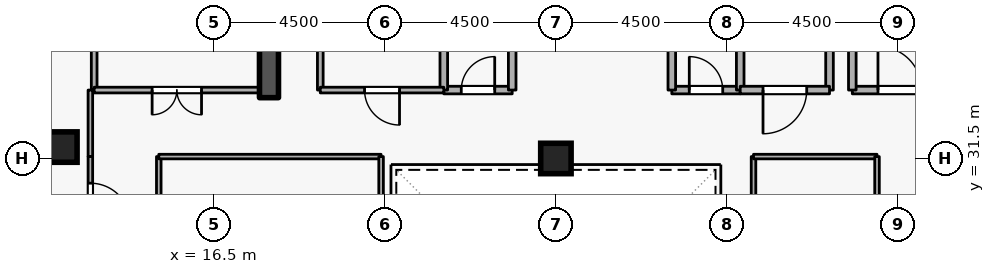
"""IFC4 building model, lengths in metres.
Left out: names, types, materials, properties, quantities, classifications, styles, units other than length and angle.
Written with IfcOpenShell. Run it as: python <this file> out.ifc"""

import sys

from ifc_helpers import new_model, si_unit, direction, frame, frame_2d, origin, origin_2d, place, context, subcontext, project, spatial, rectangle, extrude, element, fill, save


model = new_model("IFC4")
c1 = context("Model", 3, precision=1e-05, world=origin(), true_north=direction((0.0, 1.0)))
c2 = subcontext(c1, "Body", "Model", "MODEL_VIEW")
j1 = project(units=[si_unit("LENGTHUNIT", "METRE"), si_unit("PLANEANGLEUNIT", "RADIAN")], contexts=[c1])
p1 = place(None, origin())
s1 = spatial("IfcSite", under=j1, at=p1, CompositionType="ELEMENT")
p2 = place(p1, origin())
s2 = spatial("IfcBuilding", under=s1, at=p2, CompositionType="ELEMENT")
p3 = place(p2, frame((0.0, 0.0, 254.7)))
s3 = spatial("IfcBuildingStorey", under=s2, at=p3, CompositionType="ELEMENT", Elevation=254.7)
p4 = place(p3, frame((17.95, 33.1, 0.0), z_axis=(0.0, 0.0, 1.0), x_axis=(0.0, 1.0, 0.0)))
e1 = element("IfcWall", 1, at=p4, inside=s3, PredefinedType="SHEAR", context=c2, shape_type="SweptSolid", body=[
    extrude(rectangle(XDim=5.8, YDim=0.5, at=frame_2d((2.9, 0.0))), origin(), (0.0, 0.0, 1.0), 3.6),
])
for number, where, z_axis, x_axis in (
    (2, (12.5, 31.8, 0.0), (0.0, 0.0, 1.0), (1.0, 0.0, 0.0)),
    (3, (25.5, 31.5, 0.0), (0.0, 0.0, 1.0), (1.0, 0.0, 0.0)),
):
    element("IfcColumn", number, at=place(p3, frame(where, z_axis=z_axis, x_axis=x_axis)), inside=s3, PredefinedType="COLUMN", context=c2, shape_type="SweptSolid", body=[
        extrude(rectangle(XDim=0.8, YDim=0.8, at=origin_2d()), origin(), (0.0, 0.0, 1.0), 3.6),
    ])
p5 = place(p3, frame((33.3, 33.3, 0.0), z_axis=(0.0, 0.0, 1.0), x_axis=(1.0, 0.0, 0.0)))
e4 = element("IfcWall", 4, at=p5, inside=s3, PredefinedType="STANDARD", context=c2, shape_type="SweptSolid", body=[
    extrude(rectangle(XDim=2.5, YDim=0.2, at=frame_2d((1.25, 0.0))), origin(), (0.0, 0.0, 1.0), 3.32),
])
p6 = place(p5, frame((0.675, 0.0, 0.0)))
e5 = element("IfcOpeningElement", 5, at=p6, cuts=e4, PredefinedType="OPENING", context=c2, shape_type="SweptSolid", body=[
    extrude(rectangle(XDim=1.15, YDim=2.1, at=frame_2d((0.575, 1.05))), frame((0.0, 0.11, 0.0), z_axis=(0.0, -1.0, 0.0), x_axis=(1.0, 0.0, 0.0)), (0.0, 0.0, 1.0), 0.22),
])
p7 = place(p3, frame((33.3, 35.6, 0.0), z_axis=(0.0, 0.0, 1.0), x_axis=(0.0, -1.0, 0.0)))
e6 = element("IfcWall", 6, at=p7, inside=s3, PredefinedType="STANDARD", context=c2, shape_type="SweptSolid", body=[
    extrude(rectangle(XDim=2.3, YDim=0.2, at=frame_2d((1.15, 0.0))), origin(), (0.0, 0.0, 1.0), 2.525),
])
p8 = place(p3, frame((22.55, 33.3, 0.0), z_axis=(0.0, 0.0, 1.0), x_axis=(1.0, 0.0, 0.0)))
e7 = element("IfcWall", 7, at=p8, inside=s3, PredefinedType="STANDARD", context=c2, shape_type="SweptSolid", body=[
    extrude(rectangle(XDim=1.8, YDim=0.2, at=frame_2d((0.9, 0.0))), origin(), (0.0, 0.0, 1.0), 3.32),
])
p9 = place(p8, frame((0.46, 0.0, 0.0)))
e8 = element("IfcOpeningElement", 8, at=p9, cuts=e7, PredefinedType="OPENING", context=c2, shape_type="SweptSolid", body=[
    extrude(rectangle(XDim=0.88, YDim=2.04, at=frame_2d((0.44, 1.02))), frame((0.0, 0.11, 0.0), z_axis=(0.0, -1.0, 0.0), x_axis=(1.0, 0.0, 0.0)), (0.0, 0.0, 1.0), 0.22),
])
for number, where, z_axis, x_axis in (
    (9, (24.35, 33.3, 0.0), (0.0, 0.0, 1.0), (0.0, 1.0, 0.0)),
    (10, (22.55, 35.35, 0.0), (0.0, 0.0, 1.0), (0.0, -1.0, 0.0)),
):
    element("IfcWall", number, at=place(p3, frame(where, z_axis=z_axis, x_axis=x_axis)), inside=s3, PredefinedType="STANDARD", context=c2, shape_type="SweptSolid", body=[
        extrude(rectangle(XDim=2.05, YDim=0.2, at=frame_2d((1.025, 0.0))), origin(), (0.0, 0.0, 1.0), 3.32),
    ])
p10 = place(p3, frame((28.55, 33.3, 0.0), z_axis=(0.0, 0.0, 1.0), x_axis=(1.0, 0.0, 0.0)))
e11 = element("IfcWall", 11, at=p10, inside=s3, PredefinedType="STANDARD", context=c2, shape_type="SweptSolid", body=[
    extrude(rectangle(XDim=1.8, YDim=0.2, at=frame_2d((0.9, 0.0))), origin(), (0.0, 0.0, 1.0), 3.32),
])
p11 = place(p10, frame((0.46, 0.0, 0.0)))
e12 = element("IfcOpeningElement", 12, at=p11, cuts=e11, PredefinedType="OPENING", context=c2, shape_type="SweptSolid", body=[
    extrude(rectangle(XDim=0.88, YDim=2.04, at=frame_2d((0.44, 1.02))), frame((0.0, 0.11, 0.0), z_axis=(0.0, -1.0, 0.0), x_axis=(1.0, 0.0, 0.0)), (0.0, 0.0, 1.0), 0.22),
])
for number, where, z_axis, x_axis in (
    (13, (30.35, 33.3, 0.0), (0.0, 0.0, 1.0), (0.0, 1.0, 0.0)),
    (14, (28.55, 35.35, 0.0), (0.0, 0.0, 1.0), (0.0, -1.0, 0.0)),
):
    element("IfcWall", number, at=place(p3, frame(where, z_axis=z_axis, x_axis=x_axis)), inside=s3, PredefinedType="STANDARD", context=c2, shape_type="SweptSolid", body=[
        extrude(rectangle(XDim=2.05, YDim=0.2, at=frame_2d((1.025, 0.0))), origin(), (0.0, 0.0, 1.0), 3.32),
    ])
p12 = place(p3, frame((32.7, 35.35, 0.0), z_axis=(0.0, 0.0, 1.0), x_axis=(0.0, -1.0, 0.0)))
e15 = element("IfcWall", 15, at=p12, inside=s3, PredefinedType="STANDARD", context=c2, shape_type="SweptSolid", body=[
    extrude(rectangle(XDim=2.05, YDim=0.2, at=frame_2d((1.025, 0.0))), origin(), (0.0, 0.0, 1.0), 2.525),
])
p13 = place(p3, frame((32.7, 33.3, 0.0), z_axis=(0.0, 0.0, 1.0), x_axis=(-1.0, 0.0, 0.0)))
e16 = element("IfcWall", 16, at=p13, inside=s3, PredefinedType="STANDARD", context=c2, shape_type="SweptSolid", body=[
    extrude(rectangle(XDim=2.35, YDim=0.2, at=frame_2d((1.175, 0.0))), origin(), (0.0, 0.0, 1.0), 3.32),
])
p14 = place(p13, frame((0.6, 0.0, 0.0)))
e17 = element("IfcOpeningElement", 17, at=p14, cuts=e16, PredefinedType="OPENING", context=c2, shape_type="SweptSolid", body=[
    extrude(rectangle(XDim=1.15, YDim=2.1, at=frame_2d((0.575, 1.05))), frame((0.0, 0.11, 0.0), z_axis=(0.0, -1.0, 0.0), x_axis=(1.0, 0.0, 0.0)), (0.0, 0.0, 1.0), 0.22),
])
p15 = place(p3, frame((19.3, 33.3, 0.0), z_axis=(0.0, 0.0, 1.0), x_axis=(0.0, 1.0, 0.0)))
e18 = element("IfcWall", 18, at=p15, inside=s3, PredefinedType="PARTITIONING", context=c2, shape_type="SweptSolid", body=[
    extrude(rectangle(XDim=2.05, YDim=0.15, at=frame_2d((1.025, 0.0))), origin(), (0.0, 0.0, 1.0), 3.32),
])
p16 = place(p3, frame((22.55, 33.3, 0.0), z_axis=(0.0, 0.0, 1.0), x_axis=(-1.0, 0.0, 0.0)))
e19 = element("IfcWall", 19, at=p16, inside=s3, PredefinedType="PARTITIONING", context=c2, shape_type="SweptSolid", body=[
    extrude(rectangle(XDim=3.25, YDim=0.15, at=frame_2d((1.625, 0.0))), origin(), (0.0, 0.0, 1.0), 3.32),
])
p17 = place(p16, frame((1.165, 0.0, 0.0)))
e20 = element("IfcOpeningElement", 20, at=p17, cuts=e19, PredefinedType="OPENING", context=c2, shape_type="SweptSolid", body=[
    extrude(rectangle(XDim=0.92, YDim=2.08, at=frame_2d((0.46, 1.04))), frame((0.0, 0.085, 0.0), z_axis=(0.0, -1.0, 0.0), x_axis=(1.0, 0.0, 0.0)), (0.0, 0.0, 1.0), 0.17),
])
p18 = place(p3, frame((13.35, 33.3, 0.0), z_axis=(0.0, 0.0, 1.0), x_axis=(0.0, 1.0, 0.0)))
e21 = element("IfcWall", 21, at=p18, inside=s3, PredefinedType="PARTITIONING", context=c2, shape_type="SweptSolid", body=[
    extrude(rectangle(XDim=11.42, YDim=0.15, at=frame_2d((5.71, 0.0))), origin(), (0.0, 0.0, 1.0), 3.32),
])
p19 = place(p3, frame((17.7, 33.3, 0.0), z_axis=(0.0, 0.0, 1.0), x_axis=(-1.0, 0.0, 0.0)))
e22 = element("IfcWall", 22, at=p19, inside=s3, PredefinedType="PARTITIONING", context=c2, shape_type="SweptSolid", body=[
    extrude(rectangle(XDim=4.35, YDim=0.15, at=frame_2d((2.175, 0.0))), origin(), (0.0, 0.0, 1.0), 3.32),
])
p20 = place(p19, frame((1.525, 0.0, 0.0)))
e23 = element("IfcOpeningElement", 23, at=p20, cuts=e22, PredefinedType="OPENING", context=c2, shape_type="SweptSolid", body=[
    extrude(rectangle(XDim=1.3, YDim=2.12, at=frame_2d((0.65, 1.06))), frame((0.0, 0.085, 0.0), z_axis=(0.0, -1.0, 0.0), x_axis=(1.0, 0.0, 0.0)), (0.0, 0.0, 1.0), 0.17),
])
p21 = place(p3, frame((13.25, 33.3, 0.0), z_axis=(0.0, 0.0, 1.0), x_axis=(0.0, -1.0, 0.0)))
e24 = element("IfcWall", 24, at=p21, inside=s3, PredefinedType="PARTITIONING", context=c2, shape_type="SweptSolid", body=[
    extrude(rectangle(XDim=1.75, YDim=0.12, at=frame_2d((0.875, 0.0))), origin(), (0.0, 0.0, 1.0), 3.32),
])
p22 = place(p3, frame((13.25, 31.55, 0.0), z_axis=(0.0, 0.0, 1.0), x_axis=(0.0, -1.0, 0.0)))
e25 = element("IfcWall", 25, at=p22, inside=s3, PredefinedType="PARTITIONING", context=c2, shape_type="SweptSolid", body=[
    extrude(rectangle(XDim=2.45, YDim=0.12, at=frame_2d((1.225, 0.0))), origin(), (0.0, 0.0, 1.0), 3.32),
])
p23 = place(p22, frame((0.7, 0.0, 0.0)))
e26 = element("IfcOpeningElement", 26, at=p23, cuts=e25, PredefinedType="OPENING", context=c2, shape_type="SweptSolid", body=[
    extrude(rectangle(XDim=1.05, YDim=2.1, at=frame_2d((0.525, 1.05))), frame((0.0, 0.07, 0.0), z_axis=(0.0, -1.0, 0.0), x_axis=(1.0, 0.0, 0.0)), (0.0, 0.0, 1.0), 0.14),
])
p24 = place(p3, frame((15.05, 22.45, 0.0), z_axis=(0.0, 0.0, 1.0), x_axis=(0.0, 1.0, 0.0)))
e27 = element("IfcWall", 27, at=p24, inside=s3, PredefinedType="PARTITIONING", context=c2, shape_type="SweptSolid", body=[
    extrude(rectangle(XDim=9.1, YDim=0.12, at=frame_2d((4.55, 0.0))), origin(), (0.0, 0.0, 1.0), 3.32),
])
p25 = place(p24, frame((4.075, 0.0, 0.0)))
e28 = element("IfcOpeningElement", 28, at=p25, cuts=e27, PredefinedType="OPENING", context=c2, shape_type="SweptSolid", body=[
    extrude(rectangle(XDim=0.95, YDim=2.1, at=frame_2d((0.475, 1.05))), frame((0.0, 0.07, 0.0), z_axis=(0.0, -1.0, 0.0), x_axis=(1.0, 0.0, 0.0)), (0.0, 0.0, 1.0), 0.14),
])
p26 = place(p3, frame((15.05, 31.55, 0.0), z_axis=(0.0, 0.0, 1.0), x_axis=(1.0, 0.0, 0.0)))
e29 = element("IfcWall", 29, at=p26, inside=s3, PredefinedType="PARTITIONING", context=c2, shape_type="SweptSolid", body=[
    extrude(rectangle(XDim=5.85, YDim=0.12, at=frame_2d((2.925, 0.0))), origin(), (0.0, 0.0, 1.0), 3.32),
])
for number, where, z_axis, x_axis in (
    (30, (20.9, 31.55, 0.0), (0.0, 0.0, 1.0), (0.0, -1.0, 0.0)),
    (31, (30.7, 22.45, 0.0), (0.0, 0.0, 1.0), (0.0, 1.0, 0.0)),
):
    element("IfcWall", number, at=place(p3, frame(where, z_axis=z_axis, x_axis=x_axis)), inside=s3, PredefinedType="PARTITIONING", context=c2, shape_type="SweptSolid", body=[
        extrude(rectangle(XDim=9.1, YDim=0.12, at=frame_2d((4.55, 0.0))), origin(), (0.0, 0.0, 1.0), 3.32),
    ])
p27 = place(p3, frame((30.7, 31.55, 0.0), z_axis=(0.0, 0.0, 1.0), x_axis=(1.0, 0.0, 0.0)))
e32 = element("IfcWall", 32, at=p27, inside=s3, PredefinedType="PARTITIONING", context=c2, shape_type="SweptSolid", body=[
    extrude(rectangle(XDim=3.25, YDim=0.12, at=frame_2d((1.625, 0.0))), origin(), (0.0, 0.0, 1.0), 3.32),
])
p28 = place(p3, frame((33.95, 31.55, 0.0), z_axis=(0.0, 0.0, 1.0), x_axis=(0.0, -1.0, 0.0)))
e33 = element("IfcWall", 33, at=p28, inside=s3, PredefinedType="PARTITIONING", context=c2, shape_type="SweptSolid", body=[
    extrude(rectangle(XDim=9.1, YDim=0.12, at=frame_2d((4.55, 0.0))), origin(), (0.0, 0.0, 1.0), 3.32),
])
p29 = place(p28, frame((4.075, 0.0, 0.0)))
e34 = element("IfcOpeningElement", 34, at=p29, cuts=e33, PredefinedType="OPENING", context=c2, shape_type="SweptSolid", body=[
    extrude(rectangle(XDim=0.95, YDim=2.1, at=frame_2d((0.475, 1.05))), frame((0.0, 0.07, 0.0), z_axis=(0.0, -1.0, 0.0), x_axis=(1.0, 0.0, 0.0)), (0.0, 0.0, 1.0), 0.14),
])
p30 = place(p6, origin())
e35 = element("IfcDoor", 35, at=p30, inside=s3, OperationType="SINGLE_SWING_LEFT", PredefinedType="DOOR", context=c2, shape_type="SweptSolid", body=[
    extrude(rectangle(XDim=1.15, YDim=2.1, at=frame_2d((0.575, 1.05))), frame((0.0, 0.025, 0.0), z_axis=(0.0, -1.0, 0.0), x_axis=(1.0, 0.0, 0.0)), (0.0, 0.0, 1.0), 0.05),
])
fill(e5, e35)
p31 = place(p9, origin())
e36 = element("IfcDoor", 36, at=p31, inside=s3, OperationType="SINGLE_SWING_RIGHT", PredefinedType="DOOR", context=c2, shape_type="SweptSolid", body=[
    extrude(rectangle(XDim=0.88, YDim=2.04, at=frame_2d((0.44, 1.02))), frame((0.0, 0.025, 0.0), z_axis=(0.0, -1.0, 0.0), x_axis=(1.0, 0.0, 0.0)), (0.0, 0.0, 1.0), 0.05),
])
fill(e8, e36)
p32 = place(p11, origin())
e37 = element("IfcDoor", 37, at=p32, inside=s3, OperationType="SINGLE_SWING_LEFT", PredefinedType="DOOR", context=c2, shape_type="SweptSolid", body=[
    extrude(rectangle(XDim=0.88, YDim=2.04, at=frame_2d((0.44, 1.02))), frame((0.0, 0.025, 0.0), z_axis=(0.0, -1.0, 0.0), x_axis=(1.0, 0.0, 0.0)), (0.0, 0.0, 1.0), 0.05),
])
fill(e12, e37)
p33 = place(p17, origin())
e38 = element("IfcDoor", 38, at=p33, inside=s3, OperationType="SINGLE_SWING_LEFT", PredefinedType="DOOR", context=c2, shape_type="SweptSolid", body=[
    extrude(rectangle(XDim=0.92, YDim=2.08, at=frame_2d((0.46, 1.04))), frame((0.0, 0.025, 0.0), z_axis=(0.0, -1.0, 0.0), x_axis=(1.0, 0.0, 0.0)), (0.0, 0.0, 1.0), 0.05),
])
fill(e20, e38)
p34 = place(p14, origin())
e39 = element("IfcDoor", 39, at=p34, inside=s3, OperationType="SINGLE_SWING_RIGHT", PredefinedType="DOOR", context=c2, shape_type="SweptSolid", body=[
    extrude(rectangle(XDim=1.15, YDim=2.1, at=frame_2d((0.575, 1.05))), frame((0.0, 0.025, 0.0), z_axis=(0.0, -1.0, 0.0), x_axis=(1.0, 0.0, 0.0)), (0.0, 0.0, 1.0), 0.05),
])
fill(e17, e39)
p35 = place(p20, origin())
e40 = element("IfcDoor", 40, at=p35, inside=s3, OperationType="DOUBLE_DOOR_SINGLE_SWING", PredefinedType="DOOR", context=c2, shape_type="SweptSolid", body=[
    extrude(rectangle(XDim=1.3, YDim=2.12, at=frame_2d((0.65, 1.06))), frame((0.0, 0.025, 0.0), z_axis=(0.0, -1.0, 0.0), x_axis=(1.0, 0.0, 0.0)), (0.0, 0.0, 1.0), 0.05),
])
fill(e23, e40)
p36 = place(p23, origin())
e41 = element("IfcDoor", 41, at=p36, inside=s3, OperationType="SINGLE_SWING_RIGHT", PredefinedType="DOOR", context=c2, shape_type="SweptSolid", body=[
    extrude(rectangle(XDim=1.05, YDim=2.1, at=frame_2d((0.525, 1.05))), frame((0.0, 0.025, 0.0), z_axis=(0.0, -1.0, 0.0), x_axis=(1.0, 0.0, 0.0)), (0.0, 0.0, 1.0), 0.05),
])
fill(e26, e41)
save(model, sys.argv[1])
